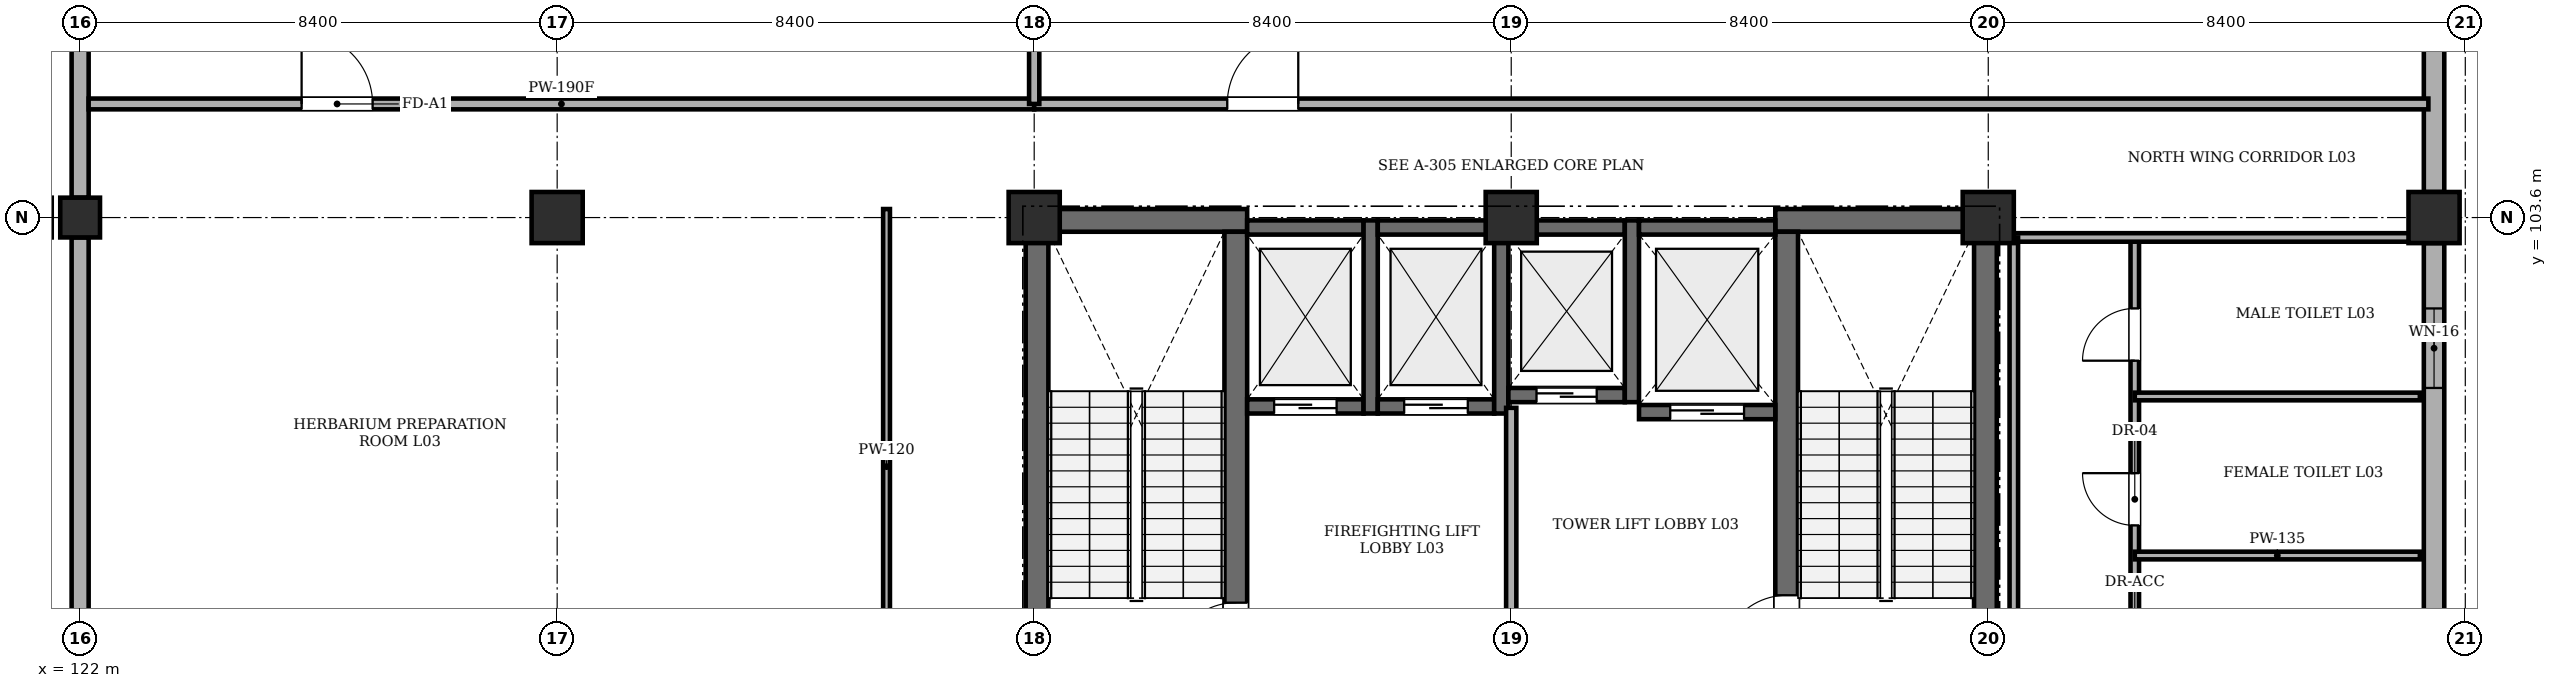
"""IFC4 building model, lengths in metres.
Left out: names, types, materials, properties, quantities, classifications, styles, units other than length and angle.
Written with IfcOpenShell. Run it as: python <this file> out.ifc"""

import sys

from ifc_helpers import new_model, si_unit, direction, frame, frame_2d, origin, origin_2d, place, context, subcontext, project, spatial, rectangle, extrude, element, fill, save


model = new_model("IFC4")
c1 = context("Model", 3, precision=1e-05, world=origin(), true_north=direction((0.0, 1.0)))
c2 = subcontext(c1, "Body", "Model", "MODEL_VIEW")
j1 = project(units=[si_unit("LENGTHUNIT", "METRE"), si_unit("PLANEANGLEUNIT", "RADIAN")], contexts=[c1])
p1 = place(None, origin())
s1 = spatial("IfcSite", under=j1, at=p1, CompositionType="ELEMENT")
p2 = place(p1, origin())
s2 = spatial("IfcBuilding", under=s1, at=p2, CompositionType="ELEMENT")
p3 = place(p2, frame((0.0, 0.0, 10.2)))
s3 = spatial("IfcBuildingStorey", under=s2, at=p3, CompositionType="ELEMENT", Elevation=10.2)
p4 = place(p3, frame((122.0, 103.6, 0.0), z_axis=(0.0, 0.0, 1.0), x_axis=(1.0, 0.0, 0.0)))
e1 = element("IfcColumn", 1, at=p4, inside=s3, PredefinedType="COLUMN", context=c2, shape_type="SweptSolid", body=[
    extrude(rectangle(XDim=0.7, YDim=0.7, at=origin_2d()), origin(), (0.0, 0.0, 1.0), 4.26),
])
for number, where, z_axis, x_axis in (
    (2, (130.4, 103.6, 0.0), (0.0, 0.0, 1.0), (1.0, 0.0, 0.0)),
    (3, (138.8, 103.6, 0.0), (0.0, 0.0, 1.0), (1.0, 0.0, 0.0)),
    (4, (147.2, 103.6, 0.0), (0.0, 0.0, 1.0), (1.0, 0.0, 0.0)),
    (5, (155.6, 103.6, 0.0), (0.0, 0.0, 1.0), (1.0, 0.0, 0.0)),
    (6, (163.45, 103.6, 0.0), (0.0, 0.0, 1.0), (1.0, 0.0, 0.0)),
):
    element("IfcColumn", number, at=place(p3, frame(where, z_axis=z_axis, x_axis=x_axis)), inside=s3, PredefinedType="COLUMN", context=c2, shape_type="SweptSolid", body=[
        extrude(rectangle(XDim=0.9, YDim=0.9, at=origin_2d()), origin(), (0.0, 0.0, 1.0), 4.26),
    ])
p5 = place(p3, frame((138.65, 103.55, 0.0), z_axis=(0.0, 0.0, 1.0), x_axis=(1.0, 0.0, 0.0)))
e7 = element("IfcWall", 7, at=p5, inside=s3, PredefinedType="SHEAR", context=c2, shape_type="SweptSolid", body=[
    extrude(rectangle(XDim=3.9, YDim=0.4, at=frame_2d((1.95, 0.0))), origin(), (0.0, 0.0, 1.0), 4.26),
])
p6 = place(p3, frame((138.85, 95.45, 0.0), z_axis=(0.0, 0.0, 1.0), x_axis=(0.0, 1.0, 0.0)))
e8 = element("IfcWall", 8, at=p6, inside=s3, PredefinedType="SHEAR", context=c2, shape_type="SweptSolid", body=[
    extrude(rectangle(XDim=7.9, YDim=0.4, at=frame_2d((3.95, 0.0))), origin(), (0.0, 0.0, 1.0), 4.26),
])
p7 = place(p3, frame((142.35, 95.45, 0.0), z_axis=(0.0, 0.0, 1.0), x_axis=(0.0, 1.0, 0.0)))
e9 = element("IfcWall", 9, at=p7, inside=s3, PredefinedType="SHEAR", context=c2, shape_type="SweptSolid", body=[
    extrude(rectangle(XDim=7.9, YDim=0.4, at=frame_2d((3.95, 0.0))), origin(), (0.0, 0.0, 1.0), 4.26),
])
p8 = place(p7, frame((0.22, 0.0, 0.0)))
e10 = element("IfcOpeningElement", 10, at=p8, cuts=e9, PredefinedType="OPENING", context=c2, shape_type="SweptSolid", body=[
    extrude(rectangle(XDim=1.15, YDim=2.15, at=frame_2d((0.575, 1.075))), frame((0.0, 0.21, 0.0), z_axis=(0.0, -1.0, 0.0), x_axis=(1.0, 0.0, 0.0)), (0.0, 0.0, 1.0), 0.42),
])
p9 = place(p3, frame((151.85, 103.55, 0.0), z_axis=(0.0, 0.0, 1.0), x_axis=(1.0, 0.0, 0.0)))
e11 = element("IfcWall", 11, at=p9, inside=s3, PredefinedType="SHEAR", context=c2, shape_type="SweptSolid", body=[
    extrude(rectangle(XDim=3.9, YDim=0.4, at=frame_2d((1.95, 0.0))), origin(), (0.0, 0.0, 1.0), 4.26),
])
p10 = place(p3, frame((152.05, 95.45, 0.0), z_axis=(0.0, 0.0, 1.0), x_axis=(0.0, 1.0, 0.0)))
e12 = element("IfcWall", 12, at=p10, inside=s3, PredefinedType="SHEAR", context=c2, shape_type="SweptSolid", body=[
    extrude(rectangle(XDim=7.9, YDim=0.4, at=frame_2d((3.95, 0.0))), origin(), (0.0, 0.0, 1.0), 4.26),
])
p11 = place(p10, frame((0.35, 0.0, 0.0)))
e13 = element("IfcOpeningElement", 13, at=p11, cuts=e12, PredefinedType="OPENING", context=c2, shape_type="SweptSolid", body=[
    extrude(rectangle(XDim=1.15, YDim=2.15, at=frame_2d((0.575, 1.075))), frame((0.0, 0.21, 0.0), z_axis=(0.0, -1.0, 0.0), x_axis=(1.0, 0.0, 0.0)), (0.0, 0.0, 1.0), 0.42),
])
p12 = place(p3, frame((155.55, 95.45, 0.0), z_axis=(0.0, 0.0, 1.0), x_axis=(0.0, 1.0, 0.0)))
e14 = element("IfcWall", 14, at=p12, inside=s3, PredefinedType="SHEAR", context=c2, shape_type="SweptSolid", body=[
    extrude(rectangle(XDim=7.9, YDim=0.4, at=frame_2d((3.95, 0.0))), origin(), (0.0, 0.0, 1.0), 4.26),
])
p13 = place(p3, frame((142.55, 100.275, 0.0), z_axis=(0.0, 0.0, 1.0), x_axis=(1.0, 0.0, 0.0)))
e15 = element("IfcWall", 15, at=p13, inside=s3, PredefinedType="SHEAR", context=c2, shape_type="SweptSolid", body=[
    extrude(rectangle(XDim=2.05, YDim=0.25, at=frame_2d((1.025, 0.0))), origin(), (0.0, 0.0, 1.0), 4.26),
])
p14 = place(p13, frame((0.475, 0.0, 0.0)))
e16 = element("IfcOpeningElement", 16, at=p14, cuts=e15, PredefinedType="OPENING", context=c2, shape_type="SweptSolid", body=[
    extrude(rectangle(XDim=1.1, YDim=2.15, at=frame_2d((0.55, 1.075))), frame((0.0, 0.135, 0.0), z_axis=(0.0, -1.0, 0.0), x_axis=(1.0, 0.0, 0.0)), (0.0, 0.0, 1.0), 0.27),
])
p15 = place(p3, frame((142.55, 103.425, 0.0), z_axis=(0.0, 0.0, 1.0), x_axis=(1.0, 0.0, 0.0)))
e17 = element("IfcWall", 17, at=p15, inside=s3, PredefinedType="SHEAR", context=c2, shape_type="SweptSolid", body=[
    extrude(rectangle(XDim=2.05, YDim=0.25, at=frame_2d((1.025, 0.0))), origin(), (0.0, 0.0, 1.0), 4.26),
])
p16 = place(p3, frame((144.725, 100.15, 0.0), z_axis=(0.0, 0.0, 1.0), x_axis=(0.0, 1.0, 0.0)))
e18 = element("IfcWall", 18, at=p16, inside=s3, PredefinedType="SHEAR", context=c2, shape_type="SweptSolid", body=[
    extrude(rectangle(XDim=3.4, YDim=0.25, at=frame_2d((1.7, 0.0))), origin(), (0.0, 0.0, 1.0), 4.26),
])
p17 = place(p3, frame((144.85, 100.275, 0.0), z_axis=(0.0, 0.0, 1.0), x_axis=(1.0, 0.0, 0.0)))
e19 = element("IfcWall", 19, at=p17, inside=s3, PredefinedType="SHEAR", context=c2, shape_type="SweptSolid", body=[
    extrude(rectangle(XDim=2.05, YDim=0.25, at=frame_2d((1.025, 0.0))), origin(), (0.0, 0.0, 1.0), 4.26),
])
p18 = place(p17, frame((0.465, 0.0, 0.0)))
e20 = element("IfcOpeningElement", 20, at=p18, cuts=e19, PredefinedType="OPENING", context=c2, shape_type="SweptSolid", body=[
    extrude(rectangle(XDim=1.12, YDim=2.15, at=frame_2d((0.56, 1.075))), frame((0.0, 0.135, 0.0), z_axis=(0.0, -1.0, 0.0), x_axis=(1.0, 0.0, 0.0)), (0.0, 0.0, 1.0), 0.27),
])
p19 = place(p3, frame((144.85, 103.425, 0.0), z_axis=(0.0, 0.0, 1.0), x_axis=(1.0, 0.0, 0.0)))
e21 = element("IfcWall", 21, at=p19, inside=s3, PredefinedType="SHEAR", context=c2, shape_type="SweptSolid", body=[
    extrude(rectangle(XDim=2.05, YDim=0.25, at=frame_2d((1.025, 0.0))), origin(), (0.0, 0.0, 1.0), 4.26),
])
p20 = place(p3, frame((147.025, 100.15, 0.0), z_axis=(0.0, 0.0, 1.0), x_axis=(0.0, 1.0, 0.0)))
e22 = element("IfcWall", 22, at=p20, inside=s3, PredefinedType="SHEAR", context=c2, shape_type="SweptSolid", body=[
    extrude(rectangle(XDim=3.4, YDim=0.25, at=frame_2d((1.7, 0.0))), origin(), (0.0, 0.0, 1.0), 4.26),
])
p21 = place(p3, frame((147.15, 100.475, 0.0), z_axis=(0.0, 0.0, 1.0), x_axis=(1.0, 0.0, 0.0)))
e23 = element("IfcWall", 23, at=p21, inside=s3, PredefinedType="SHEAR", context=c2, shape_type="SweptSolid", body=[
    extrude(rectangle(XDim=2.05, YDim=0.25, at=frame_2d((1.025, 0.0))), origin(), (0.0, 0.0, 1.0), 4.26),
])
p22 = place(p21, frame((0.495, 0.0, 0.0)))
e24 = element("IfcOpeningElement", 24, at=p22, cuts=e23, PredefinedType="OPENING", context=c2, shape_type="SweptSolid", body=[
    extrude(rectangle(XDim=1.06, YDim=2.15, at=frame_2d((0.53, 1.075))), frame((0.0, 0.135, 0.0), z_axis=(0.0, -1.0, 0.0), x_axis=(1.0, 0.0, 0.0)), (0.0, 0.0, 1.0), 0.27),
])
p23 = place(p3, frame((147.15, 103.425, 0.0), z_axis=(0.0, 0.0, 1.0), x_axis=(1.0, 0.0, 0.0)))
e25 = element("IfcWall", 25, at=p23, inside=s3, PredefinedType="SHEAR", context=c2, shape_type="SweptSolid", body=[
    extrude(rectangle(XDim=2.05, YDim=0.25, at=frame_2d((1.025, 0.0))), origin(), (0.0, 0.0, 1.0), 4.26),
])
p24 = place(p3, frame((149.325, 100.35, 0.0), z_axis=(0.0, 0.0, 1.0), x_axis=(0.0, 1.0, 0.0)))
e26 = element("IfcWall", 26, at=p24, inside=s3, PredefinedType="SHEAR", context=c2, shape_type="SweptSolid", body=[
    extrude(rectangle(XDim=3.2, YDim=0.25, at=frame_2d((1.6, 0.0))), origin(), (0.0, 0.0, 1.0), 4.26),
])
p25 = place(p3, frame((149.45, 100.175, 0.0), z_axis=(0.0, 0.0, 1.0), x_axis=(1.0, 0.0, 0.0)))
e27 = element("IfcWall", 27, at=p25, inside=s3, PredefinedType="SHEAR", context=c2, shape_type="SweptSolid", body=[
    extrude(rectangle(XDim=2.4, YDim=0.25, at=frame_2d((1.2, 0.0))), origin(), (0.0, 0.0, 1.0), 4.26),
])
p26 = place(p25, frame((0.55, 0.0, 0.0)))
e28 = element("IfcOpeningElement", 28, at=p26, cuts=e27, PredefinedType="OPENING", context=c2, shape_type="SweptSolid", body=[
    extrude(rectangle(XDim=1.3, YDim=2.25, at=frame_2d((0.65, 1.125))), frame((0.0, 0.135, 0.0), z_axis=(0.0, -1.0, 0.0), x_axis=(1.0, 0.0, 0.0)), (0.0, 0.0, 1.0), 0.27),
])
p27 = place(p3, frame((149.45, 103.425, 0.0), z_axis=(0.0, 0.0, 1.0), x_axis=(1.0, 0.0, 0.0)))
e29 = element("IfcWall", 29, at=p27, inside=s3, PredefinedType="SHEAR", context=c2, shape_type="SweptSolid", body=[
    extrude(rectangle(XDim=2.4, YDim=0.25, at=frame_2d((1.2, 0.0))), origin(), (0.0, 0.0, 1.0), 4.26),
])
p28 = place(p3, frame((163.45, 103.15, 0.0), z_axis=(0.0, 0.0, 1.0), x_axis=(0.0, -1.0, 0.0)))
e30 = element("IfcWall", 30, at=p28, inside=s3, PredefinedType="STANDARD", context=c2, shape_type="SweptSolid", body=[
    extrude(rectangle(XDim=7.5, YDim=0.36, at=frame_2d((3.75, 0.0))), origin(), (0.0, 0.0, 1.0), 3.51),
])
p29 = place(p28, frame((1.15, 0.0, 1.1)))
e31 = element("IfcOpeningElement", 31, at=p29, cuts=e30, PredefinedType="OPENING", context=c2, shape_type="SweptSolid", body=[
    extrude(rectangle(XDim=1.4, YDim=1.4, at=frame_2d((0.7, 0.7))), frame((0.0, 0.19, 0.0), z_axis=(0.0, -1.0, 0.0), x_axis=(1.0, 0.0, 0.0)), (0.0, 0.0, 1.0), 0.38),
])
p30 = place(p3, frame((163.45, 111.0, 0.0), z_axis=(0.0, 0.0, 1.0), x_axis=(0.0, -1.0, 0.0)))
e32 = element("IfcWall", 32, at=p30, inside=s3, PredefinedType="STANDARD", context=c2, shape_type="SweptSolid", body=[
    extrude(rectangle(XDim=6.95, YDim=0.36, at=frame_2d((3.475, 0.0))), origin(), (0.0, 0.0, 1.0), 3.51),
])
p31 = place(p30, frame((1.15, 0.0, 1.1)))
e33 = element("IfcOpeningElement", 33, at=p31, cuts=e32, PredefinedType="OPENING", context=c2, shape_type="SweptSolid", body=[
    extrude(rectangle(XDim=1.8, YDim=1.8, at=frame_2d((0.9, 0.9))), frame((0.0, 0.19, 0.0), z_axis=(0.0, -1.0, 0.0), x_axis=(1.0, 0.0, 0.0)), (0.0, 0.0, 1.0), 0.38),
])
p32 = place(p3, frame((122.0, 95.55, 0.0), z_axis=(0.0, 0.0, 1.0), x_axis=(0.0, 1.0, 0.0)))
e34 = element("IfcWall", 34, at=p32, inside=s3, PredefinedType="STANDARD", context=c2, shape_type="SweptSolid", body=[
    extrude(rectangle(XDim=7.7, YDim=0.3, at=frame_2d((3.85, 0.0))), origin(), (0.0, 0.0, 1.0), 3.51),
])
p33 = place(p3, frame((122.0, 103.95, 0.0), z_axis=(0.0, 0.0, 1.0), x_axis=(0.0, 1.0, 0.0)))
e35 = element("IfcWall", 35, at=p33, inside=s3, PredefinedType="STANDARD", context=c2, shape_type="SweptSolid", body=[
    extrude(rectangle(XDim=7.15, YDim=0.3, at=frame_2d((3.575, 0.0))), origin(), (0.0, 0.0, 1.0), 3.51),
])
p34 = place(p3, frame((147.2, 95.75, 0.0), z_axis=(0.0, 0.0, 1.0), x_axis=(0.0, 1.0, 0.0)))
e36 = element("IfcWall", 36, at=p34, inside=s3, PredefinedType="STANDARD", context=c2, shape_type="SweptSolid", body=[
    extrude(rectangle(XDim=4.5, YDim=0.18, at=frame_2d((2.25, 0.0))), origin(), (0.0, 0.0, 1.0), 3.51),
])
p35 = place(p3, frame((158.18, 94.68, 0.0), z_axis=(0.0, 0.0, 1.0), x_axis=(0.0, 1.0, 0.0)))
e37 = element("IfcWall", 37, at=p35, inside=s3, PredefinedType="PARTITIONING", context=c2, shape_type="SweptSolid", body=[
    extrude(rectangle(XDim=8.57, YDim=0.15, at=frame_2d((4.285, 0.0))), origin(), (0.0, 0.0, 1.0), 4.26),
])
p36 = place(p35, frame((0.8, 0.0, 0.0)))
e38 = element("IfcOpeningElement", 38, at=p36, cuts=e37, PredefinedType="OPENING", context=c2, shape_type="SweptSolid", body=[
    extrude(rectangle(XDim=1.0, YDim=2.12, at=frame_2d((0.5, 1.06))), frame((0.0, 0.085, 0.0), z_axis=(0.0, -1.0, 0.0), x_axis=(1.0, 0.0, 0.0)), (0.0, 0.0, 1.0), 0.17),
])
p37 = place(p35, frame((3.5, 0.0, 0.0)))
e39 = element("IfcOpeningElement", 39, at=p37, cuts=e37, PredefinedType="OPENING", context=c2, shape_type="SweptSolid", body=[
    extrude(rectangle(XDim=0.92, YDim=2.1, at=frame_2d((0.46, 1.05))), frame((0.0, 0.085, 0.0), z_axis=(0.0, -1.0, 0.0), x_axis=(1.0, 0.0, 0.0)), (0.0, 0.0, 1.0), 0.17),
])
p38 = place(p35, frame((6.4, 0.0, 0.0)))
e40 = element("IfcOpeningElement", 40, at=p38, cuts=e37, PredefinedType="OPENING", context=c2, shape_type="SweptSolid", body=[
    extrude(rectangle(XDim=0.92, YDim=2.1, at=frame_2d((0.46, 1.05))), frame((0.0, 0.085, 0.0), z_axis=(0.0, -1.0, 0.0), x_axis=(1.0, 0.0, 0.0)), (0.0, 0.0, 1.0), 0.17),
])
for number, where, z_axis, x_axis in (
    (41, (158.18, 97.65, 0.0), (0.0, 0.0, 1.0), (1.0, 0.0, 0.0)),
    (42, (158.18, 100.45, 0.0), (0.0, 0.0, 1.0), (1.0, 0.0, 0.0)),
):
    element("IfcWall", number, at=place(p3, frame(where, z_axis=z_axis, x_axis=x_axis)), inside=s3, PredefinedType="PARTITIONING", context=c2, shape_type="SweptSolid", body=[
        extrude(rectangle(XDim=5.02, YDim=0.135, at=frame_2d((2.51, 0.0))), origin(), (0.0, 0.0, 1.0), 4.26),
    ])
p39 = place(p3, frame((156.05, 103.25, 0.0), z_axis=(0.0, 0.0, 1.0), x_axis=(1.0, 0.0, 0.0)))
e43 = element("IfcWall", 43, at=p39, inside=s3, PredefinedType="PARTITIONING", context=c2, shape_type="SweptSolid", body=[
    extrude(rectangle(XDim=7.15, YDim=0.15, at=frame_2d((3.575, 0.0))), origin(), (0.0, 0.0, 1.0), 4.26),
])
p40 = place(p3, frame((156.05, 94.68, 0.0), z_axis=(0.0, 0.0, 1.0), x_axis=(0.0, 1.0, 0.0)))
e44 = element("IfcWall", 44, at=p40, inside=s3, PredefinedType="PARTITIONING", context=c2, shape_type="SweptSolid", body=[
    extrude(rectangle(XDim=8.57, YDim=0.15, at=frame_2d((4.285, 0.0))), origin(), (0.0, 0.0, 1.0), 4.26),
])
p41 = place(p3, frame((136.2, 94.68, 0.0), z_axis=(0.0, 0.0, 1.0), x_axis=(0.0, 1.0, 0.0)))
e45 = element("IfcWall", 45, at=p41, inside=s3, PredefinedType="PARTITIONING", context=c2, shape_type="SweptSolid", body=[
    extrude(rectangle(XDim=9.07, YDim=0.12, at=frame_2d((4.535, 0.0))), origin(), (0.0, 0.0, 1.0), 4.26),
])
p42 = place(p3, frame((122.15, 105.6, 0.0), z_axis=(0.0, 0.0, 1.0), x_axis=(1.0, 0.0, 0.0)))
e46 = element("IfcWall", 46, at=p42, inside=s3, PredefinedType="SOLIDWALL", context=c2, shape_type="SweptSolid", body=[
    extrude(rectangle(XDim=16.65, YDim=0.19, at=frame_2d((8.325, 0.0))), origin(), (0.0, 0.0, 1.0), 4.26),
])
p43 = place(p42, frame((3.75, 0.0, 0.0)))
e47 = element("IfcOpeningElement", 47, at=p43, cuts=e46, PredefinedType="OPENING", context=c2, shape_type="SweptSolid", body=[
    extrude(rectangle(XDim=1.25, YDim=2.2, at=frame_2d((0.625, 1.1))), frame((0.0, 0.105, 0.0), z_axis=(0.0, -1.0, 0.0), x_axis=(1.0, 0.0, 0.0)), (0.0, 0.0, 1.0), 0.21),
])
p44 = place(p3, frame((138.8, 105.6, 0.0), z_axis=(0.0, 0.0, 1.0), x_axis=(1.0, 0.0, 0.0)))
e48 = element("IfcWall", 48, at=p44, inside=s3, PredefinedType="SOLIDWALL", context=c2, shape_type="SweptSolid", body=[
    extrude(rectangle(XDim=24.55, YDim=0.19, at=frame_2d((12.275, 0.0))), origin(), (0.0, 0.0, 1.0), 4.26),
])
p45 = place(p44, frame((3.4, 0.0, 0.0)))
e49 = element("IfcOpeningElement", 49, at=p45, cuts=e48, PredefinedType="OPENING", context=c2, shape_type="SweptSolid", body=[
    extrude(rectangle(XDim=1.25, YDim=2.2, at=frame_2d((0.625, 1.1))), frame((0.0, 0.105, 0.0), z_axis=(0.0, -1.0, 0.0), x_axis=(1.0, 0.0, 0.0)), (0.0, 0.0, 1.0), 0.21),
])
p46 = place(p3, frame((138.8, 105.6, 0.0), z_axis=(0.0, 0.0, 1.0), x_axis=(0.0, 1.0, 0.0)))
e50 = element("IfcWall", 50, at=p46, inside=s3, PredefinedType="STANDARD", context=c2, shape_type="SweptSolid", body=[
    extrude(rectangle(XDim=5.75, YDim=0.18, at=frame_2d((2.875, 0.0))), origin(), (0.0, 0.0, 1.0), 3.51),
])
p47 = place(p29, origin())
e51 = element("IfcWindow", 51, at=p47, inside=s3, PartitioningType="SINGLE_PANEL", PredefinedType="WINDOW", context=c2, shape_type="SweptSolid", body=[
    extrude(rectangle(XDim=1.4, YDim=1.4, at=frame_2d((0.7, 0.7))), frame((0.0, 0.03, 0.0), z_axis=(0.0, -1.0, 0.0), x_axis=(1.0, 0.0, 0.0)), (0.0, 0.0, 1.0), 0.06),
])
fill(e31, e51)
p48 = place(p37, origin())
e52 = element("IfcDoor", 52, at=p48, inside=s3, OperationType="SINGLE_SWING_RIGHT", PredefinedType="DOOR", context=c2, shape_type="SweptSolid", body=[
    extrude(rectangle(XDim=0.92, YDim=2.1, at=frame_2d((0.46, 1.05))), frame((0.0, 0.025, 0.0), z_axis=(0.0, -1.0, 0.0), x_axis=(1.0, 0.0, 0.0)), (0.0, 0.0, 1.0), 0.05),
])
fill(e39, e52)
p49 = place(p38, origin())
e53 = element("IfcDoor", 53, at=p49, inside=s3, OperationType="SINGLE_SWING_LEFT", PredefinedType="DOOR", context=c2, shape_type="SweptSolid", body=[
    extrude(rectangle(XDim=0.92, YDim=2.1, at=frame_2d((0.46, 1.05))), frame((0.0, 0.025, 0.0), z_axis=(0.0, -1.0, 0.0), x_axis=(1.0, 0.0, 0.0)), (0.0, 0.0, 1.0), 0.05),
])
fill(e40, e53)
p50 = place(p43, origin())
e54 = element("IfcDoor", 54, at=p50, inside=s3, OperationType="SINGLE_SWING_LEFT", PredefinedType="DOOR", context=c2, shape_type="SweptSolid", body=[
    extrude(rectangle(XDim=1.25, YDim=2.2, at=frame_2d((0.625, 1.1))), frame((0.0, 0.025, 0.0), z_axis=(0.0, -1.0, 0.0), x_axis=(1.0, 0.0, 0.0)), (0.0, 0.0, 1.0), 0.05),
])
fill(e47, e54)
p51 = place(p45, origin())
e55 = element("IfcDoor", 55, at=p51, inside=s3, OperationType="SINGLE_SWING_RIGHT", PredefinedType="DOOR", context=c2, shape_type="SweptSolid", body=[
    extrude(rectangle(XDim=1.25, YDim=2.2, at=frame_2d((0.625, 1.1))), frame((0.0, 0.025, 0.0), z_axis=(0.0, -1.0, 0.0), x_axis=(1.0, 0.0, 0.0)), (0.0, 0.0, 1.0), 0.05),
])
fill(e49, e55)
p52 = place(p8, origin())
e56 = element("IfcDoor", 56, at=p52, inside=s3, OperationType="SINGLE_SWING_LEFT", PredefinedType="DOOR", context=c2, shape_type="SweptSolid", body=[
    extrude(rectangle(XDim=1.15, YDim=2.15, at=frame_2d((0.575, 1.075))), frame((0.0, 0.025, 0.0), z_axis=(0.0, -1.0, 0.0), x_axis=(1.0, 0.0, 0.0)), (0.0, 0.0, 1.0), 0.05),
])
fill(e10, e56)
p53 = place(p11, origin())
e57 = element("IfcDoor", 57, at=p53, inside=s3, OperationType="SINGLE_SWING_LEFT", PredefinedType="DOOR", context=c2, shape_type="SweptSolid", body=[
    extrude(rectangle(XDim=1.15, YDim=2.15, at=frame_2d((0.575, 1.075))), frame((0.0, 0.025, 0.0), z_axis=(0.0, -1.0, 0.0), x_axis=(1.0, 0.0, 0.0)), (0.0, 0.0, 1.0), 0.05),
])
fill(e13, e57)
p54 = place(p14, origin())
e58 = element("IfcDoor", 58, at=p54, inside=s3, OperationType="SLIDING_TO_LEFT", PredefinedType="DOOR", context=c2, shape_type="SweptSolid", body=[
    extrude(rectangle(XDim=1.1, YDim=2.15, at=frame_2d((0.55, 1.075))), frame((0.0, 0.025, 0.0), z_axis=(0.0, -1.0, 0.0), x_axis=(1.0, 0.0, 0.0)), (0.0, 0.0, 1.0), 0.05),
])
fill(e16, e58)
p55 = place(p18, origin())
e59 = element("IfcDoor", 59, at=p55, inside=s3, OperationType="SLIDING_TO_LEFT", PredefinedType="DOOR", context=c2, shape_type="SweptSolid", body=[
    extrude(rectangle(XDim=1.12, YDim=2.15, at=frame_2d((0.56, 1.075))), frame((0.0, 0.025, 0.0), z_axis=(0.0, -1.0, 0.0), x_axis=(1.0, 0.0, 0.0)), (0.0, 0.0, 1.0), 0.05),
])
fill(e20, e59)
p56 = place(p22, origin())
e60 = element("IfcDoor", 60, at=p56, inside=s3, OperationType="SLIDING_TO_LEFT", PredefinedType="DOOR", context=c2, shape_type="SweptSolid", body=[
    extrude(rectangle(XDim=1.06, YDim=2.15, at=frame_2d((0.53, 1.075))), frame((0.0, 0.025, 0.0), z_axis=(0.0, -1.0, 0.0), x_axis=(1.0, 0.0, 0.0)), (0.0, 0.0, 1.0), 0.05),
])
fill(e24, e60)
p57 = place(p26, origin())
e61 = element("IfcDoor", 61, at=p57, inside=s3, OperationType="SLIDING_TO_LEFT", PredefinedType="DOOR", context=c2, shape_type="SweptSolid", body=[
    extrude(rectangle(XDim=1.3, YDim=2.25, at=frame_2d((0.65, 1.125))), frame((0.0, 0.025, 0.0), z_axis=(0.0, -1.0, 0.0), x_axis=(1.0, 0.0, 0.0)), (0.0, 0.0, 1.0), 0.05),
])
fill(e28, e61)
save(model, sys.argv[1])
